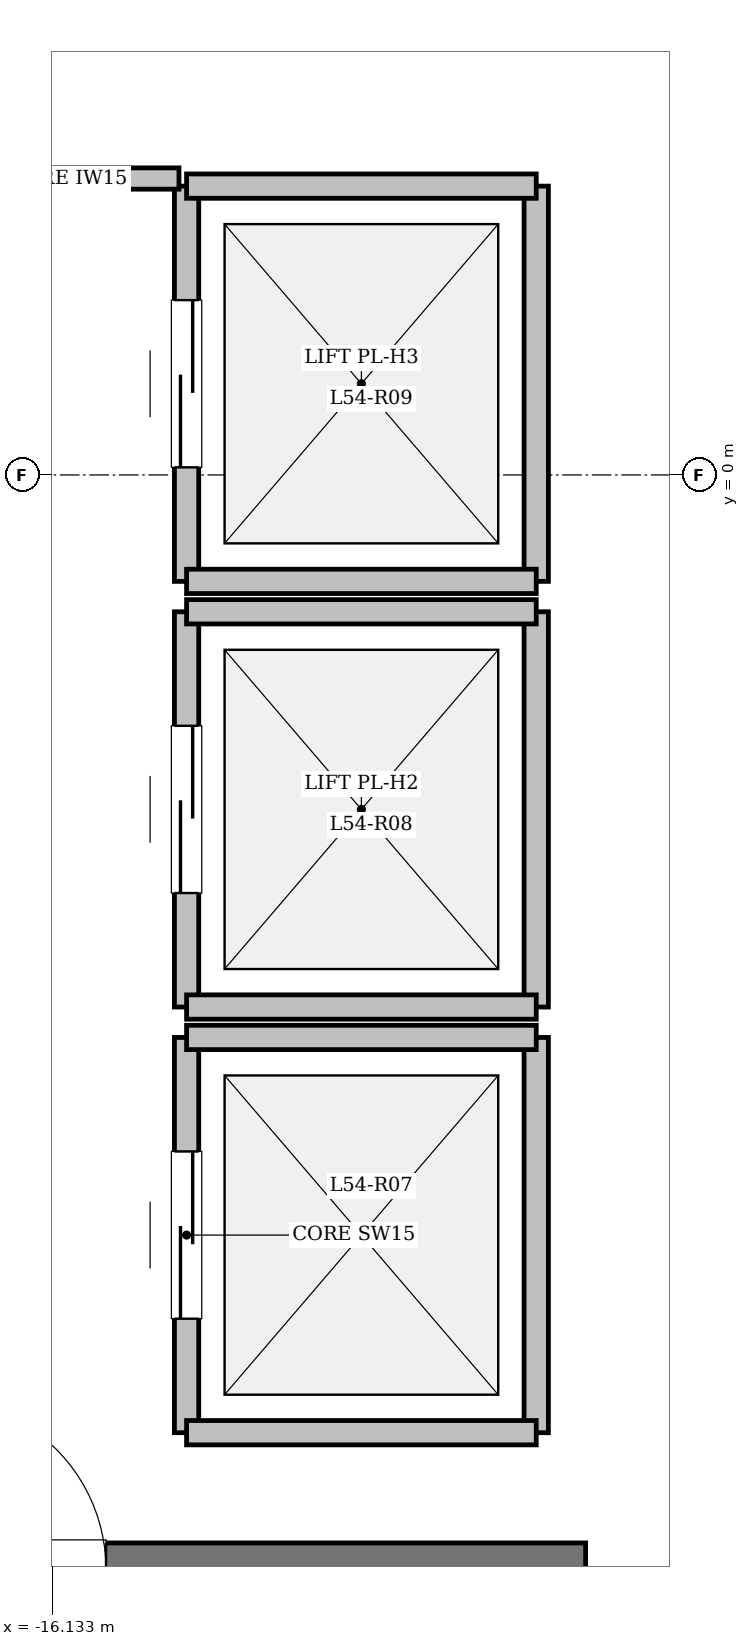
"""IFC4 building model, lengths in metres.
Left out: names, types, materials, properties, quantities, classifications, styles, units other than length and angle.
Written with IfcOpenShell. Run it as: python <this file> out.ifc"""

import sys

from ifc_helpers import new_model, si_unit, direction, frame, frame_2d, origin, place, context, subcontext, project, spatial, rectangle, extrude, element, fill, save


model = new_model("IFC4")
c1 = context("Model", 3, precision=1e-05, world=origin(), true_north=direction((0.0, 1.0)))
c2 = subcontext(c1, "Body", "Model", "MODEL_VIEW")
j1 = project(units=[si_unit("LENGTHUNIT", "METRE"), si_unit("PLANEANGLEUNIT", "RADIAN")], contexts=[c1])
p1 = place(None, origin())
s1 = spatial("IfcSite", under=j1, at=p1, CompositionType="ELEMENT")
p2 = place(p1, origin())
s2 = spatial("IfcBuilding", under=s1, at=p2, CompositionType="ELEMENT")
p3 = place(p2, frame((0.0, 0.0, 190.25)))
s3 = spatial("IfcBuildingStorey", under=s2, at=p3, CompositionType="ELEMENT", Elevation=190.25)
p4 = place(p3, frame((-15.25, -6.3, 0.0), z_axis=(0.0, 0.0, 1.0), x_axis=(0.0, 1.0, 0.0)))
e1 = element("IfcWall", 1, at=p4, inside=s3, PredefinedType="SOLIDWALL", context=c2, shape_type="SweptSolid", body=[
    extrude(rectangle(XDim=2.6, YDim=0.16, at=frame_2d((1.3, 0.0))), origin(), (0.0, 0.0, 1.0), 3.1),
])
p5 = place(p4, frame((0.75, 0.0, 0.0)))
e2 = element("IfcOpeningElement", 2, at=p5, cuts=e1, PredefinedType="OPENING", context=c2, shape_type="SweptSolid", body=[
    extrude(rectangle(XDim=1.1, YDim=2.15, at=frame_2d((0.55, 1.075))), frame((0.0, 0.09, 0.0), z_axis=(0.0, -1.0, 0.0), x_axis=(1.0, 0.0, 0.0)), (0.0, 0.0, 1.0), 0.18),
])
p6 = place(p3, frame((-12.95, -6.3, 0.0), z_axis=(0.0, 0.0, 1.0), x_axis=(0.0, 1.0, 0.0)))
e3 = element("IfcWall", 3, at=p6, inside=s3, PredefinedType="SOLIDWALL", context=c2, shape_type="SweptSolid", body=[
    extrude(rectangle(XDim=2.6, YDim=0.16, at=frame_2d((1.3, 0.0))), origin(), (0.0, 0.0, 1.0), 3.1),
])
for number, where, z_axis, x_axis in (
    (4, (-15.25, -6.3, 0.0), (0.0, 0.0, 1.0), (1.0, 0.0, 0.0)),
    (5, (-15.25, -3.7, 0.0), (0.0, 0.0, 1.0), (1.0, 0.0, 0.0)),
):
    element("IfcWall", number, at=place(p3, frame(where, z_axis=z_axis, x_axis=x_axis)), inside=s3, PredefinedType="SOLIDWALL", context=c2, shape_type="SweptSolid", body=[
        extrude(rectangle(XDim=2.3, YDim=0.16, at=frame_2d((1.15, 0.0))), origin(), (0.0, 0.0, 1.0), 3.1),
    ])
p7 = place(p3, frame((-15.25, -3.5, 0.0), z_axis=(0.0, 0.0, 1.0), x_axis=(0.0, 1.0, 0.0)))
e6 = element("IfcWall", 6, at=p7, inside=s3, PredefinedType="SOLIDWALL", context=c2, shape_type="SweptSolid", body=[
    extrude(rectangle(XDim=2.6, YDim=0.16, at=frame_2d((1.3, 0.0))), origin(), (0.0, 0.0, 1.0), 3.1),
])
p8 = place(p7, frame((0.75, 0.0, 0.0)))
e7 = element("IfcOpeningElement", 7, at=p8, cuts=e6, PredefinedType="OPENING", context=c2, shape_type="SweptSolid", body=[
    extrude(rectangle(XDim=1.1, YDim=2.15, at=frame_2d((0.55, 1.075))), frame((0.0, 0.09, 0.0), z_axis=(0.0, -1.0, 0.0), x_axis=(1.0, 0.0, 0.0)), (0.0, 0.0, 1.0), 0.18),
])
p9 = place(p3, frame((-12.95, -3.5, 0.0), z_axis=(0.0, 0.0, 1.0), x_axis=(0.0, 1.0, 0.0)))
e8 = element("IfcWall", 8, at=p9, inside=s3, PredefinedType="SOLIDWALL", context=c2, shape_type="SweptSolid", body=[
    extrude(rectangle(XDim=2.6, YDim=0.16, at=frame_2d((1.3, 0.0))), origin(), (0.0, 0.0, 1.0), 3.1),
])
for number, where, z_axis, x_axis in (
    (9, (-15.25, -3.5, 0.0), (0.0, 0.0, 1.0), (1.0, 0.0, 0.0)),
    (10, (-15.25, -0.9, 0.0), (0.0, 0.0, 1.0), (1.0, 0.0, 0.0)),
):
    element("IfcWall", number, at=place(p3, frame(where, z_axis=z_axis, x_axis=x_axis)), inside=s3, PredefinedType="SOLIDWALL", context=c2, shape_type="SweptSolid", body=[
        extrude(rectangle(XDim=2.3, YDim=0.16, at=frame_2d((1.15, 0.0))), origin(), (0.0, 0.0, 1.0), 3.1),
    ])
p10 = place(p3, frame((-15.25, -0.7, 0.0), z_axis=(0.0, 0.0, 1.0), x_axis=(0.0, 1.0, 0.0)))
e11 = element("IfcWall", 11, at=p10, inside=s3, PredefinedType="SOLIDWALL", context=c2, shape_type="SweptSolid", body=[
    extrude(rectangle(XDim=2.6, YDim=0.16, at=frame_2d((1.3, 0.0))), origin(), (0.0, 0.0, 1.0), 3.1),
])
p11 = place(p10, frame((0.75, 0.0, 0.0)))
e12 = element("IfcOpeningElement", 12, at=p11, cuts=e11, PredefinedType="OPENING", context=c2, shape_type="SweptSolid", body=[
    extrude(rectangle(XDim=1.1, YDim=2.15, at=frame_2d((0.55, 1.075))), frame((0.0, 0.09, 0.0), z_axis=(0.0, -1.0, 0.0), x_axis=(1.0, 0.0, 0.0)), (0.0, 0.0, 1.0), 0.18),
])
p12 = place(p3, frame((-12.95, -0.7, 0.0), z_axis=(0.0, 0.0, 1.0), x_axis=(0.0, 1.0, 0.0)))
e13 = element("IfcWall", 13, at=p12, inside=s3, PredefinedType="SOLIDWALL", context=c2, shape_type="SweptSolid", body=[
    extrude(rectangle(XDim=2.6, YDim=0.16, at=frame_2d((1.3, 0.0))), origin(), (0.0, 0.0, 1.0), 3.1),
])
for number, where, z_axis, x_axis in (
    (14, (-15.25, -0.7, 0.0), (0.0, 0.0, 1.0), (1.0, 0.0, 0.0)),
    (15, (-15.25, 1.9, 0.0), (0.0, 0.0, 1.0), (1.0, 0.0, 0.0)),
):
    element("IfcWall", number, at=place(p3, frame(where, z_axis=z_axis, x_axis=x_axis)), inside=s3, PredefinedType="SOLIDWALL", context=c2, shape_type="SweptSolid", body=[
        extrude(rectangle(XDim=2.3, YDim=0.16, at=frame_2d((1.15, 0.0))), origin(), (0.0, 0.0, 1.0), 3.1),
    ])
p13 = place(p3, frame((-18.625, -7.2, 0.0), z_axis=(0.0, 0.0, 1.0), x_axis=(1.0, 0.0, 0.0)))
e16 = element("IfcWall", 16, at=p13, inside=s3, PredefinedType="SHEAR", context=c2, shape_type="SweptSolid", body=[
    extrude(rectangle(XDim=8.55, YDim=0.35, at=frame_2d((4.275, 0.0))), origin(), (0.0, 0.0, 1.0), 3.35),
])
p14 = place(p13, frame((1.725, 0.0, 0.0)))
e17 = element("IfcOpeningElement", 17, at=p14, cuts=e16, PredefinedType="OPENING", context=c2, shape_type="SweptSolid", body=[
    extrude(rectangle(XDim=1.12, YDim=2.15, at=frame_2d((0.56, 1.075))), frame((0.0, 0.185, 0.0), z_axis=(0.0, -1.0, 0.0), x_axis=(1.0, 0.0, 0.0)), (0.0, 0.0, 1.0), 0.37),
])
p15 = place(p3, frame((-18.45, 1.95, 0.0), z_axis=(0.0, 0.0, 1.0), x_axis=(1.0, 0.0, 0.0)))
e18 = element("IfcWall", 18, at=p15, inside=s3, PredefinedType="PARTITIONING", context=c2, shape_type="SweptSolid", body=[
    extrude(rectangle(XDim=3.15, YDim=0.14, at=frame_2d((1.575, 0.0))), origin(), (0.0, 0.0, 1.0), 3.1),
])
p16 = place(p15, frame((0.85, 0.0, 0.0)))
e19 = element("IfcOpeningElement", 19, at=p16, cuts=e18, PredefinedType="OPENING", context=c2, shape_type="SweptSolid", body=[
    extrude(rectangle(XDim=0.9, YDim=2.08, at=frame_2d((0.45, 1.04))), frame((0.0, 0.08, 0.0), z_axis=(0.0, -1.0, 0.0), x_axis=(1.0, 0.0, 0.0)), (0.0, 0.0, 1.0), 0.16),
])
p17 = place(p3, frame((-12.9, -3.1, 0.0), z_axis=(0.0, 0.0, 1.0), x_axis=(1.0, 0.0, 0.0)))
e20 = element("IfcWall", 20, at=p17, inside=s3, PredefinedType="PARTITIONING", context=c2, shape_type="SweptSolid", body=[
    extrude(rectangle(XDim=2.7, YDim=0.14, at=frame_2d((1.35, 0.0))), origin(), (0.0, 0.0, 1.0), 3.1),
])
p18 = place(p5, origin())
e21 = element("IfcDoor", 21, at=p18, inside=s3, OperationType="SLIDING_TO_LEFT", PredefinedType="DOOR", context=c2, shape_type="SweptSolid", body=[
    extrude(rectangle(XDim=1.1, YDim=2.15, at=frame_2d((0.55, 1.075))), frame((0.0, 0.025, 0.0), z_axis=(0.0, -1.0, 0.0), x_axis=(1.0, 0.0, 0.0)), (0.0, 0.0, 1.0), 0.05),
])
fill(e2, e21)
p19 = place(p8, origin())
e22 = element("IfcDoor", 22, at=p19, inside=s3, OperationType="SLIDING_TO_LEFT", PredefinedType="DOOR", context=c2, shape_type="SweptSolid", body=[
    extrude(rectangle(XDim=1.1, YDim=2.15, at=frame_2d((0.55, 1.075))), frame((0.0, 0.025, 0.0), z_axis=(0.0, -1.0, 0.0), x_axis=(1.0, 0.0, 0.0)), (0.0, 0.0, 1.0), 0.05),
])
fill(e7, e22)
p20 = place(p11, origin())
e23 = element("IfcDoor", 23, at=p20, inside=s3, OperationType="SLIDING_TO_LEFT", PredefinedType="DOOR", context=c2, shape_type="SweptSolid", body=[
    extrude(rectangle(XDim=1.1, YDim=2.15, at=frame_2d((0.55, 1.075))), frame((0.0, 0.025, 0.0), z_axis=(0.0, -1.0, 0.0), x_axis=(1.0, 0.0, 0.0)), (0.0, 0.0, 1.0), 0.05),
])
fill(e12, e23)
p21 = place(p14, origin())
e24 = element("IfcDoor", 24, at=p21, inside=s3, OperationType="SINGLE_SWING_LEFT", PredefinedType="DOOR", context=c2, shape_type="SweptSolid", body=[
    extrude(rectangle(XDim=1.12, YDim=2.15, at=frame_2d((0.56, 1.075))), frame((0.0, 0.025, 0.0), z_axis=(0.0, -1.0, 0.0), x_axis=(1.0, 0.0, 0.0)), (0.0, 0.0, 1.0), 0.05),
])
fill(e17, e24)
save(model, sys.argv[1])
